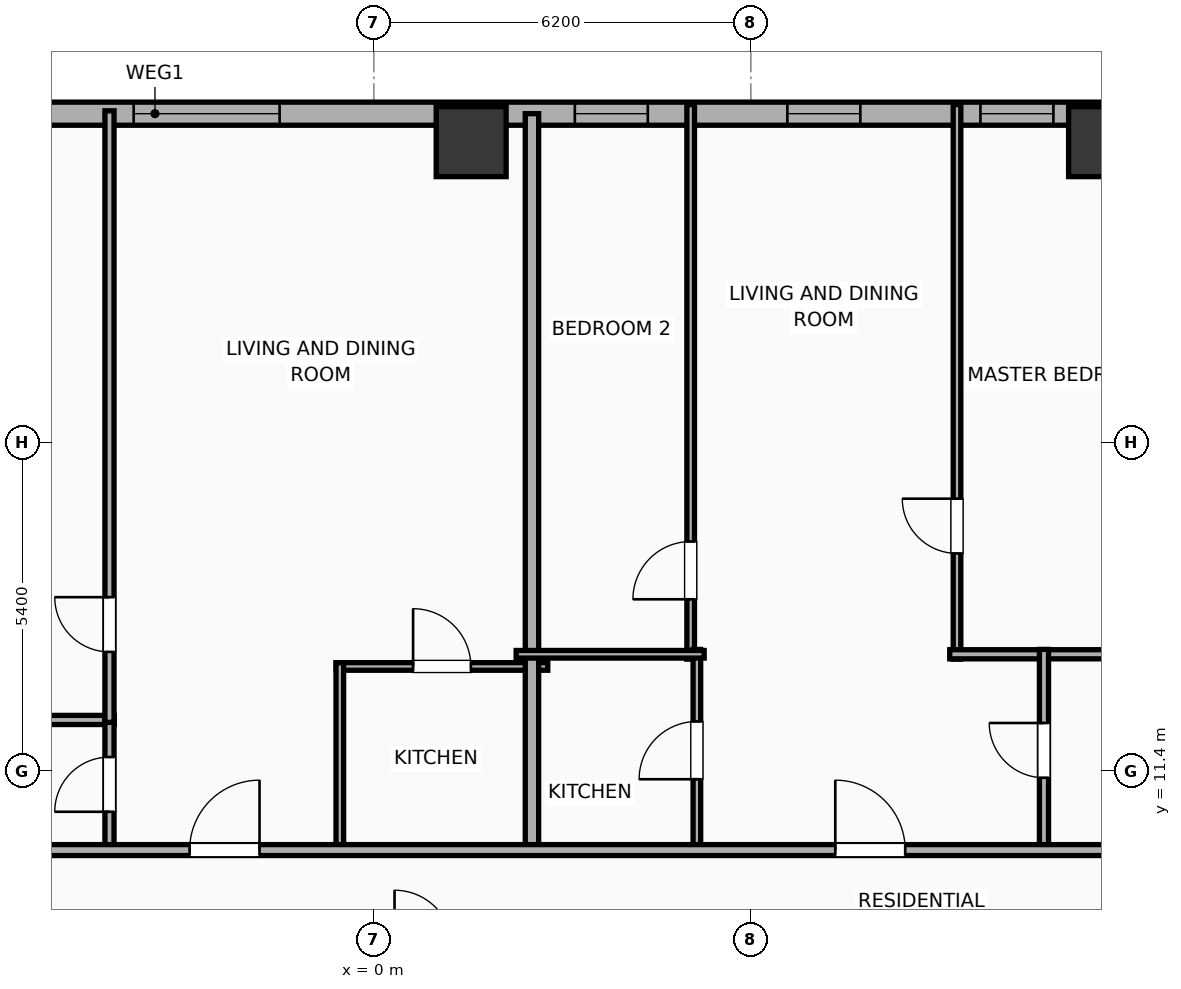
"""IFC4 building model, lengths in metres.
Left out: names, types, materials, properties, quantities, classifications, styles, units other than length and angle.
Written with IfcOpenShell. Run it as: python <this file> out.ifc"""

import sys

from ifc_helpers import new_model, si_unit, direction, frame, frame_2d, origin, origin_2d, place, context, subcontext, project, spatial, rectangle, hollow_rectangle, extrude, element, fill, save


model = new_model("IFC4")
c1 = context("Model", 3, precision=1e-05, world=origin(), true_north=direction((0.0, 1.0)))
c2 = subcontext(c1, "Body", "Model", "MODEL_VIEW")
j1 = project(units=[si_unit("LENGTHUNIT", "METRE"), si_unit("PLANEANGLEUNIT", "RADIAN")], contexts=[c1])
p1 = place(None, origin())
s1 = spatial("IfcSite", under=j1, at=p1, CompositionType="ELEMENT")
p2 = place(p1, origin())
s2 = spatial("IfcBuilding", under=s1, at=p2, CompositionType="ELEMENT")
p3 = place(p2, frame((0.0, 0.0, 45.5)))
s3 = spatial("IfcBuildingStorey", under=s2, at=p3, CompositionType="ELEMENT", Elevation=45.5)
for number, where, z_axis, x_axis in (
    (1, (12.0, 21.75, 0.0), (0.0, 0.0, 1.0), (1.0, 0.0, 0.0)),
    (2, (1.6, 21.75, 0.0), (0.0, 0.0, 1.0), (1.0, 0.0, 0.0)),
):
    element("IfcColumn", number, at=place(p3, frame(where, z_axis=z_axis, x_axis=x_axis)), inside=s3, PredefinedType="COLUMN", context=c2, shape_type="SweptSolid", body=[
        extrude(hollow_rectangle(XDim=1.15, YDim=1.15, WallThickness=0.04, at=origin_2d()), origin(), (0.0, 0.0, 1.0), 3.9),
    ])
p4 = place(p3, frame((-29.581, 22.21, 0.0), z_axis=(0.0, 0.0, 1.0), x_axis=(1.0, 0.0, 0.0)))
e3 = element("IfcWall", 3, at=p4, inside=s3, PredefinedType="ELEMENTEDWALL", context=c2, shape_type="SweptSolid", body=[
    extrude(rectangle(XDim=51.963, YDim=0.38, at=frame_2d((25.981, 0.0))), origin(), (0.0, 0.0, 1.0), 3.65),
])
p5 = place(p4, frame((25.631, 0.0, 0.75)))
e4 = element("IfcOpeningElement", 4, at=p5, cuts=e3, PredefinedType="OPENING", context=c2, shape_type="SweptSolid", body=[
    extrude(rectangle(XDim=2.4, YDim=2.1, at=frame_2d((1.2, 1.05))), frame((0.0, 0.2, 0.0), z_axis=(0.0, -1.0, 0.0), x_axis=(1.0, 0.0, 0.0)), (0.0, 0.0, 1.0), 0.4),
])
p6 = place(p4, frame((42.952, 0.0, 0.75)))
e5 = element("IfcOpeningElement", 5, at=p6, cuts=e3, PredefinedType="OPENING", context=c2, shape_type="SweptSolid", body=[
    extrude(rectangle(XDim=2.4, YDim=2.1, at=frame_2d((1.2, 1.05))), frame((0.0, 0.2, 0.0), z_axis=(0.0, -1.0, 0.0), x_axis=(1.0, 0.0, 0.0)), (0.0, 0.0, 1.0), 0.4),
])
p7 = place(p4, frame((1.731, 0.0, 0.75)))
e6 = element("IfcOpeningElement", 6, at=p7, cuts=e3, PredefinedType="OPENING", context=c2, shape_type="SweptSolid", body=[
    extrude(rectangle(XDim=1.2, YDim=2.05, at=frame_2d((0.6, 1.025))), frame((0.0, 0.2, 0.0), z_axis=(0.0, -1.0, 0.0), x_axis=(1.0, 0.0, 0.0)), (0.0, 0.0, 1.0), 0.4),
])
p8 = place(p4, frame((5.272, 0.0, 0.75)))
e7 = element("IfcOpeningElement", 7, at=p8, cuts=e3, PredefinedType="OPENING", context=c2, shape_type="SweptSolid", body=[
    extrude(rectangle(XDim=1.2, YDim=2.05, at=frame_2d((0.6, 1.025))), frame((0.0, 0.2, 0.0), z_axis=(0.0, -1.0, 0.0), x_axis=(1.0, 0.0, 0.0)), (0.0, 0.0, 1.0), 0.4),
])
p9 = place(p4, frame((8.356, 0.0, 0.75)))
e8 = element("IfcOpeningElement", 8, at=p9, cuts=e3, PredefinedType="OPENING", context=c2, shape_type="SweptSolid", body=[
    extrude(rectangle(XDim=1.2, YDim=2.05, at=frame_2d((0.6, 1.025))), frame((0.0, 0.2, 0.0), z_axis=(0.0, -1.0, 0.0), x_axis=(1.0, 0.0, 0.0)), (0.0, 0.0, 1.0), 0.4),
])
p10 = place(p4, frame((15.632, 0.0, 0.75)))
e9 = element("IfcOpeningElement", 9, at=p10, cuts=e3, PredefinedType="OPENING", context=c2, shape_type="SweptSolid", body=[
    extrude(rectangle(XDim=1.2, YDim=2.05, at=frame_2d((0.6, 1.025))), frame((0.0, 0.2, 0.0), z_axis=(0.0, -1.0, 0.0), x_axis=(1.0, 0.0, 0.0)), (0.0, 0.0, 1.0), 0.4),
])
p11 = place(p4, frame((12.137, 0.0, 0.75)))
e10 = element("IfcOpeningElement", 10, at=p11, cuts=e3, PredefinedType="OPENING", context=c2, shape_type="SweptSolid", body=[
    extrude(rectangle(XDim=1.2, YDim=2.05, at=frame_2d((0.6, 1.025))), frame((0.0, 0.2, 0.0), z_axis=(0.0, -1.0, 0.0), x_axis=(1.0, 0.0, 0.0)), (0.0, 0.0, 1.0), 0.4),
])
p12 = place(p4, frame((18.756, 0.0, 0.75)))
e11 = element("IfcOpeningElement", 11, at=p12, cuts=e3, PredefinedType="OPENING", context=c2, shape_type="SweptSolid", body=[
    extrude(rectangle(XDim=1.2, YDim=2.05, at=frame_2d((0.6, 1.025))), frame((0.0, 0.2, 0.0), z_axis=(0.0, -1.0, 0.0), x_axis=(1.0, 0.0, 0.0)), (0.0, 0.0, 1.0), 0.4),
])
p13 = place(p4, frame((22.907, 0.0, 0.75)))
e12 = element("IfcOpeningElement", 12, at=p13, cuts=e3, PredefinedType="OPENING", context=c2, shape_type="SweptSolid", body=[
    extrude(rectangle(XDim=1.2, YDim=2.05, at=frame_2d((0.6, 1.025))), frame((0.0, 0.2, 0.0), z_axis=(0.0, -1.0, 0.0), x_axis=(1.0, 0.0, 0.0)), (0.0, 0.0, 1.0), 0.4),
])
p14 = place(p4, frame((36.381, 0.0, 0.75)))
e13 = element("IfcOpeningElement", 13, at=p14, cuts=e3, PredefinedType="OPENING", context=c2, shape_type="SweptSolid", body=[
    extrude(rectangle(XDim=1.2, YDim=2.05, at=frame_2d((0.6, 1.025))), frame((0.0, 0.2, 0.0), z_axis=(0.0, -1.0, 0.0), x_axis=(1.0, 0.0, 0.0)), (0.0, 0.0, 1.0), 0.4),
])
p15 = place(p4, frame((32.886, 0.0, 0.75)))
e14 = element("IfcOpeningElement", 14, at=p15, cuts=e3, PredefinedType="OPENING", context=c2, shape_type="SweptSolid", body=[
    extrude(rectangle(XDim=1.2, YDim=2.05, at=frame_2d((0.6, 1.025))), frame((0.0, 0.2, 0.0), z_axis=(0.0, -1.0, 0.0), x_axis=(1.0, 0.0, 0.0)), (0.0, 0.0, 1.0), 0.4),
])
p16 = place(p4, frame((39.556, 0.0, 0.75)))
e15 = element("IfcOpeningElement", 15, at=p16, cuts=e3, PredefinedType="OPENING", context=c2, shape_type="SweptSolid", body=[
    extrude(rectangle(XDim=1.2, YDim=2.05, at=frame_2d((0.6, 1.025))), frame((0.0, 0.2, 0.0), z_axis=(0.0, -1.0, 0.0), x_axis=(1.0, 0.0, 0.0)), (0.0, 0.0, 1.0), 0.4),
])
p17 = place(p4, frame((46.885, 0.0, 0.75)))
e16 = element("IfcOpeningElement", 16, at=p17, cuts=e3, PredefinedType="OPENING", context=c2, shape_type="SweptSolid", body=[
    extrude(rectangle(XDim=1.2, YDim=2.05, at=frame_2d((0.6, 1.025))), frame((0.0, 0.2, 0.0), z_axis=(0.0, -1.0, 0.0), x_axis=(1.0, 0.0, 0.0)), (0.0, 0.0, 1.0), 0.4),
])
p18 = place(p4, frame((49.531, 0.0, 0.75)))
e17 = element("IfcOpeningElement", 17, at=p18, cuts=e3, PredefinedType="OPENING", context=c2, shape_type="SweptSolid", body=[
    extrude(rectangle(XDim=1.2, YDim=2.05, at=frame_2d((0.6, 1.025))), frame((0.0, 0.2, 0.0), z_axis=(0.0, -1.0, 0.0), x_axis=(1.0, 0.0, 0.0)), (0.0, 0.0, 1.0), 0.4),
])
p19 = place(p3, frame((-8.06, 12.24, 0.0), z_axis=(0.0, 0.0, 1.0), x_axis=(1.0, 0.0, 0.0)))
e18 = element("IfcWall", 18, at=p19, inside=s3, PredefinedType="PLUMBINGWALL", context=c2, shape_type="SweptSolid", body=[
    extrude(rectangle(XDim=3.792, YDim=0.15, at=frame_2d((1.896, 0.0))), origin(), (0.0, 0.0, 1.0), 3.65),
])
p20 = place(p3, frame((-4.348, 10.08, 0.0), z_axis=(0.0, 0.0, 1.0), x_axis=(0.0, 1.0, 0.0)))
e19 = element("IfcWall", 19, at=p20, inside=s3, PredefinedType="PLUMBINGWALL", context=c2, shape_type="SweptSolid", body=[
    extrude(rectangle(XDim=2.2, YDim=0.15, at=frame_2d((1.1, 0.0))), origin(), (0.0, 0.0, 1.0), 3.65),
])
p21 = place(p20, frame((0.65, 0.0, 0.0)))
e20 = element("IfcOpeningElement", 20, at=p21, cuts=e19, PredefinedType="OPENING", context=c2, shape_type="SweptSolid", body=[
    extrude(rectangle(XDim=0.9, YDim=2.05, at=frame_2d((0.45, 1.025))), frame((0.0, 0.085, 0.0), z_axis=(0.0, -1.0, 0.0), x_axis=(1.0, 0.0, 0.0)), (0.0, 0.0, 1.0), 0.17),
])
p22 = place(p3, frame((-4.348, 12.2, 0.0), z_axis=(0.0, 0.0, 1.0), x_axis=(0.0, 1.0, 0.0)))
e21 = element("IfcWall", 21, at=p22, inside=s3, PredefinedType="PLUMBINGWALL", context=c2, shape_type="SweptSolid", body=[
    extrude(rectangle(XDim=10.058, YDim=0.15, at=frame_2d((5.029, 0.0))), origin(), (0.0, 0.0, 1.0), 3.65),
])
p23 = place(p22, frame((1.159, 0.0, 0.0)))
e22 = element("IfcOpeningElement", 22, at=p23, cuts=e21, PredefinedType="OPENING", context=c2, shape_type="SweptSolid", body=[
    extrude(rectangle(XDim=0.9, YDim=2.05, at=frame_2d((0.45, 1.025))), frame((0.0, 0.085, 0.0), z_axis=(0.0, -1.0, 0.0), x_axis=(1.0, 0.0, 0.0)), (0.0, 0.0, 1.0), 0.17),
])
p24 = place(p3, frame((-0.62, 13.12, 0.0), z_axis=(0.0, 0.0, 1.0), x_axis=(1.0, 0.0, 0.0)))
e23 = element("IfcWall", 23, at=p24, inside=s3, PredefinedType="PARTITIONING", context=c2, shape_type="SweptSolid", body=[
    extrude(rectangle(XDim=3.48, YDim=0.125, at=frame_2d((1.74, 0.0))), origin(), (0.0, 0.0, 1.0), 3.65),
])
p25 = place(p24, frame((1.265, 0.0, 0.0)))
e24 = element("IfcOpeningElement", 24, at=p25, cuts=e23, PredefinedType="OPENING", context=c2, shape_type="SweptSolid", body=[
    extrude(rectangle(XDim=0.95, YDim=2.05, at=frame_2d((0.475, 1.025))), frame((0.0, 0.073, 0.0), z_axis=(0.0, -1.0, 0.0), x_axis=(1.0, 0.0, 0.0)), (0.0, 0.0, 1.0), 0.145),
])
p26 = place(p3, frame((-0.56, 10.08, 0.0), z_axis=(0.0, 0.0, 1.0), x_axis=(0.0, 1.0, 0.0)))
e25 = element("IfcWall", 25, at=p26, inside=s3, PredefinedType="PARTITIONING", context=c2, shape_type="SweptSolid", body=[
    extrude(rectangle(XDim=3.1, YDim=0.125, at=frame_2d((1.55, 0.0))), origin(), (0.0, 0.0, 1.0), 3.65),
])
p27 = place(p3, frame((2.6, 10.02, 0.0), z_axis=(0.0, 0.0, 1.0), x_axis=(0.0, 1.0, 0.0)))
e26 = element("IfcWall", 26, at=p27, inside=s3, PredefinedType="PARTITIONING", context=c2, shape_type="SweptSolid", body=[
    extrude(rectangle(XDim=12.19, YDim=0.22, at=frame_2d((6.095, 0.0))), origin(), (0.0, 0.0, 1.0), 2.94),
])
p28 = place(p3, frame((5.21, 13.24, 0.0), z_axis=(0.0, 0.0, 1.0), x_axis=(0.0, 1.0, 0.0)))
e27 = element("IfcWall", 27, at=p28, inside=s3, PredefinedType="PARTITIONING", context=c2, shape_type="SweptSolid", body=[
    extrude(rectangle(XDim=9.12, YDim=0.125, at=frame_2d((4.56, 0.0))), origin(), (0.0, 0.0, 1.0), 3.65),
])
p29 = place(p28, frame((0.984, 0.0, 0.0)))
e28 = element("IfcOpeningElement", 28, at=p29, cuts=e27, PredefinedType="OPENING", context=c2, shape_type="SweptSolid", body=[
    extrude(rectangle(XDim=0.95, YDim=2.05, at=frame_2d((0.475, 1.025))), frame((0.0, 0.073, 0.0), z_axis=(0.0, -1.0, 0.0), x_axis=(1.0, 0.0, 0.0)), (0.0, 0.0, 1.0), 0.145),
])
p30 = place(p3, frame((9.59, 13.24, 0.0), z_axis=(0.0, 0.0, 1.0), x_axis=(0.0, 1.0, 0.0)))
e29 = element("IfcWall", 29, at=p30, inside=s3, PredefinedType="PARTITIONING", context=c2, shape_type="SweptSolid", body=[
    extrude(rectangle(XDim=9.12, YDim=0.125, at=frame_2d((4.56, 0.0))), origin(), (0.0, 0.0, 1.0), 3.65),
])
p31 = place(p30, frame((1.739, 0.0, 0.0)))
e30 = element("IfcOpeningElement", 30, at=p31, cuts=e29, PredefinedType="OPENING", context=c2, shape_type="SweptSolid", body=[
    extrude(rectangle(XDim=0.9, YDim=2.05, at=frame_2d((0.45, 1.025))), frame((0.0, 0.073, 0.0), z_axis=(0.0, -1.0, 0.0), x_axis=(1.0, 0.0, 0.0)), (0.0, 0.0, 1.0), 0.145),
])
p32 = place(p3, frame((9.47, 13.32, 0.0), z_axis=(0.0, 0.0, 1.0), x_axis=(1.0, 0.0, 0.0)))
e31 = element("IfcWall", 31, at=p32, inside=s3, PredefinedType="PLUMBINGWALL", context=c2, shape_type="SweptSolid", body=[
    extrude(rectangle(XDim=3.605, YDim=0.15, at=frame_2d((1.802, 0.0))), origin(), (0.0, 0.0, 1.0), 3.65),
])
p33 = place(p3, frame((5.312, 10.08, 0.0), z_axis=(0.0, 0.0, 1.0), x_axis=(0.0, 1.0, 0.0)))
e32 = element("IfcWall", 32, at=p33, inside=s3, PredefinedType="PARTITIONING", context=c2, shape_type="SweptSolid", body=[
    extrude(rectangle(XDim=3.32, YDim=0.125, at=frame_2d((1.66, 0.0))), origin(), (0.0, 0.0, 1.0), 3.65),
])
p34 = place(p33, frame((1.185, 0.0, 0.0)))
e33 = element("IfcOpeningElement", 33, at=p34, cuts=e32, PredefinedType="OPENING", context=c2, shape_type="SweptSolid", body=[
    extrude(rectangle(XDim=0.95, YDim=2.05, at=frame_2d((0.475, 1.025))), frame((0.0, 0.073, 0.0), z_axis=(0.0, -1.0, 0.0), x_axis=(1.0, 0.0, 0.0)), (0.0, 0.0, 1.0), 0.145),
])
p35 = place(p3, frame((2.34, 13.32, 0.0), z_axis=(0.0, 0.0, 1.0), x_axis=(1.0, 0.0, 0.0)))
e34 = element("IfcWall", 34, at=p35, inside=s3, PredefinedType="PARTITIONING", context=c2, shape_type="SweptSolid", body=[
    extrude(rectangle(XDim=3.092, YDim=0.125, at=frame_2d((1.546, 0.0))), origin(), (0.0, 0.0, 1.0), 3.65),
])
p36 = place(p3, frame((11.02, 10.08, 0.0), z_axis=(0.0, 0.0, 1.0), x_axis=(0.0, 1.0, 0.0)))
e35 = element("IfcWall", 35, at=p36, inside=s3, PredefinedType="PLUMBINGWALL", context=c2, shape_type="SweptSolid", body=[
    extrude(rectangle(XDim=3.32, YDim=0.15, at=frame_2d((1.66, 0.0))), origin(), (0.0, 0.0, 1.0), 3.65),
])
p37 = place(p36, frame((1.21, 0.0, 0.0)))
e36 = element("IfcOpeningElement", 36, at=p37, cuts=e35, PredefinedType="OPENING", context=c2, shape_type="SweptSolid", body=[
    extrude(rectangle(XDim=0.9, YDim=2.05, at=frame_2d((0.45, 1.025))), frame((0.0, 0.085, 0.0), z_axis=(0.0, -1.0, 0.0), x_axis=(1.0, 0.0, 0.0)), (0.0, 0.0, 1.0), 0.17),
])
p38 = place(p3, frame((-33.41, 10.1, 0.0), z_axis=(0.0, 0.0, 1.0), x_axis=(1.0, 0.0, 0.0)))
e37 = element("IfcWall", 37, at=p38, inside=s3, PredefinedType="PARTITIONING", context=c2, shape_type="SweptSolid", body=[
    extrude(rectangle(XDim=59.62, YDim=0.18, at=frame_2d((29.81, 0.0))), origin(), (0.0, 0.0, 1.0), 3.65),
])
p39 = place(p38, frame((3.354, 0.0, 0.0)))
e38 = element("IfcOpeningElement", 38, at=p39, cuts=e37, PredefinedType="OPENING", context=c2, shape_type="SweptSolid", body=[
    extrude(rectangle(XDim=1.15, YDim=2.05, at=frame_2d((0.575, 1.025))), frame((0.0, 0.1, 0.0), z_axis=(0.0, -1.0, 0.0), x_axis=(1.0, 0.0, 0.0)), (0.0, 0.0, 1.0), 0.2),
])
p40 = place(p38, frame((10.997, 0.0, 0.0)))
e39 = element("IfcOpeningElement", 39, at=p40, cuts=e37, PredefinedType="OPENING", context=c2, shape_type="SweptSolid", body=[
    extrude(rectangle(XDim=1.15, YDim=2.05, at=frame_2d((0.575, 1.025))), frame((0.0, 0.1, 0.0), z_axis=(0.0, -1.0, 0.0), x_axis=(1.0, 0.0, 0.0)), (0.0, 0.0, 1.0), 0.2),
])
p41 = place(p38, frame((20.232, 0.0, 0.0)))
e40 = element("IfcOpeningElement", 40, at=p41, cuts=e37, PredefinedType="OPENING", context=c2, shape_type="SweptSolid", body=[
    extrude(rectangle(XDim=1.15, YDim=2.05, at=frame_2d((0.575, 1.025))), frame((0.0, 0.1, 0.0), z_axis=(0.0, -1.0, 0.0), x_axis=(1.0, 0.0, 0.0)), (0.0, 0.0, 1.0), 0.2),
])
p42 = place(p38, frame((30.38, 0.0, 0.0)))
e41 = element("IfcOpeningElement", 41, at=p42, cuts=e37, PredefinedType="OPENING", context=c2, shape_type="SweptSolid", body=[
    extrude(rectangle(XDim=1.15, YDim=2.05, at=frame_2d((0.575, 1.025))), frame((0.0, 0.1, 0.0), z_axis=(0.0, -1.0, 0.0), x_axis=(1.0, 0.0, 0.0)), (0.0, 0.0, 1.0), 0.2),
])
p43 = place(p38, frame((40.998, 0.0, 0.0)))
e42 = element("IfcOpeningElement", 42, at=p43, cuts=e37, PredefinedType="OPENING", context=c2, shape_type="SweptSolid", body=[
    extrude(rectangle(XDim=1.15, YDim=2.05, at=frame_2d((0.575, 1.025))), frame((0.0, 0.1, 0.0), z_axis=(0.0, -1.0, 0.0), x_axis=(1.0, 0.0, 0.0)), (0.0, 0.0, 1.0), 0.2),
])
p44 = place(p38, frame((49.428, 0.0, 0.0)))
e43 = element("IfcOpeningElement", 43, at=p44, cuts=e37, PredefinedType="OPENING", context=c2, shape_type="SweptSolid", body=[
    extrude(rectangle(XDim=0.9, YDim=2.05, at=frame_2d((0.45, 1.025))), frame((0.0, 0.1, 0.0), z_axis=(0.0, -1.0, 0.0), x_axis=(1.0, 0.0, 0.0)), (0.0, 0.0, 1.0), 0.2),
])
p45 = place(p38, frame((56.07, 0.0, 0.0)))
e44 = element("IfcOpeningElement", 44, at=p45, cuts=e37, PredefinedType="OPENING", context=c2, shape_type="SweptSolid", body=[
    extrude(rectangle(XDim=0.9, YDim=2.05, at=frame_2d((0.45, 1.025))), frame((0.0, 0.1, 0.0), z_axis=(0.0, -1.0, 0.0), x_axis=(1.0, 0.0, 0.0)), (0.0, 0.0, 1.0), 0.2),
])
p46 = place(p5, origin())
e45 = element("IfcWindow", 45, at=p46, inside=s3, PartitioningType="SINGLE_PANEL", PredefinedType="WINDOW", context=c2, shape_type="SweptSolid", body=[
    extrude(rectangle(XDim=2.4, YDim=2.1, at=frame_2d((1.2, 1.05))), frame((0.0, 0.03, 0.0), z_axis=(0.0, -1.0, 0.0), x_axis=(1.0, 0.0, 0.0)), (0.0, 0.0, 1.0), 0.06),
])
fill(e4, e45)
p47 = place(p14, origin())
e46 = element("IfcWindow", 46, at=p47, inside=s3, PartitioningType="SINGLE_PANEL", PredefinedType="WINDOW", context=c2, shape_type="SweptSolid", body=[
    extrude(rectangle(XDim=1.2, YDim=2.05, at=frame_2d((0.6, 1.025))), frame((0.0, 0.03, 0.0), z_axis=(0.0, -1.0, 0.0), x_axis=(1.0, 0.0, 0.0)), (0.0, 0.0, 1.0), 0.06),
])
fill(e13, e46)
p48 = place(p15, origin())
e47 = element("IfcWindow", 47, at=p48, inside=s3, PartitioningType="SINGLE_PANEL", PredefinedType="WINDOW", context=c2, shape_type="SweptSolid", body=[
    extrude(rectangle(XDim=1.2, YDim=2.05, at=frame_2d((0.6, 1.025))), frame((0.0, 0.03, 0.0), z_axis=(0.0, -1.0, 0.0), x_axis=(1.0, 0.0, 0.0)), (0.0, 0.0, 1.0), 0.06),
])
fill(e14, e47)
p49 = place(p16, origin())
e48 = element("IfcWindow", 48, at=p49, inside=s3, PartitioningType="SINGLE_PANEL", PredefinedType="WINDOW", context=c2, shape_type="SweptSolid", body=[
    extrude(rectangle(XDim=1.2, YDim=2.05, at=frame_2d((0.6, 1.025))), frame((0.0, 0.03, 0.0), z_axis=(0.0, -1.0, 0.0), x_axis=(1.0, 0.0, 0.0)), (0.0, 0.0, 1.0), 0.06),
])
fill(e15, e48)
p50 = place(p21, origin())
e49 = element("IfcDoor", 49, at=p50, inside=s3, OperationType="SINGLE_SWING_LEFT", PredefinedType="DOOR", context=c2, shape_type="SweptSolid", body=[
    extrude(rectangle(XDim=0.9, YDim=2.05, at=frame_2d((0.45, 1.025))), frame((0.0, 0.025, 0.0), z_axis=(0.0, -1.0, 0.0), x_axis=(1.0, 0.0, 0.0)), (0.0, 0.0, 1.0), 0.05),
])
fill(e20, e49)
p51 = place(p23, origin())
e50 = element("IfcDoor", 50, at=p51, inside=s3, OperationType="SINGLE_SWING_RIGHT", PredefinedType="DOOR", context=c2, shape_type="SweptSolid", body=[
    extrude(rectangle(XDim=0.9, YDim=2.05, at=frame_2d((0.45, 1.025))), frame((0.0, 0.025, 0.0), z_axis=(0.0, -1.0, 0.0), x_axis=(1.0, 0.0, 0.0)), (0.0, 0.0, 1.0), 0.05),
])
fill(e22, e50)
p52 = place(p25, origin())
e51 = element("IfcDoor", 51, at=p52, inside=s3, OperationType="SINGLE_SWING_LEFT", PredefinedType="DOOR", context=c2, shape_type="SweptSolid", body=[
    extrude(rectangle(XDim=0.95, YDim=2.05, at=frame_2d((0.475, 1.025))), frame((0.0, 0.025, 0.0), z_axis=(0.0, -1.0, 0.0), x_axis=(1.0, 0.0, 0.0)), (0.0, 0.0, 1.0), 0.05),
])
fill(e24, e51)
p53 = place(p29, origin())
e52 = element("IfcDoor", 52, at=p53, inside=s3, OperationType="SINGLE_SWING_LEFT", PredefinedType="DOOR", context=c2, shape_type="SweptSolid", body=[
    extrude(rectangle(XDim=0.95, YDim=2.05, at=frame_2d((0.475, 1.025))), frame((0.0, 0.025, 0.0), z_axis=(0.0, -1.0, 0.0), x_axis=(1.0, 0.0, 0.0)), (0.0, 0.0, 1.0), 0.05),
])
fill(e28, e52)
p54 = place(p31, origin())
e53 = element("IfcDoor", 53, at=p54, inside=s3, OperationType="SINGLE_SWING_RIGHT", PredefinedType="DOOR", context=c2, shape_type="SweptSolid", body=[
    extrude(rectangle(XDim=0.9, YDim=2.05, at=frame_2d((0.45, 1.025))), frame((0.0, 0.025, 0.0), z_axis=(0.0, -1.0, 0.0), x_axis=(1.0, 0.0, 0.0)), (0.0, 0.0, 1.0), 0.05),
])
fill(e30, e53)
p55 = place(p34, origin())
e54 = element("IfcDoor", 54, at=p55, inside=s3, OperationType="SINGLE_SWING_LEFT", PredefinedType="DOOR", context=c2, shape_type="SweptSolid", body=[
    extrude(rectangle(XDim=0.95, YDim=2.05, at=frame_2d((0.475, 1.025))), frame((0.0, 0.025, 0.0), z_axis=(0.0, -1.0, 0.0), x_axis=(1.0, 0.0, 0.0)), (0.0, 0.0, 1.0), 0.05),
])
fill(e33, e54)
p56 = place(p37, origin())
e55 = element("IfcDoor", 55, at=p56, inside=s3, OperationType="SINGLE_SWING_RIGHT", PredefinedType="DOOR", context=c2, shape_type="SweptSolid", body=[
    extrude(rectangle(XDim=0.9, YDim=2.05, at=frame_2d((0.45, 1.025))), frame((0.0, 0.025, 0.0), z_axis=(0.0, -1.0, 0.0), x_axis=(1.0, 0.0, 0.0)), (0.0, 0.0, 1.0), 0.05),
])
fill(e36, e55)
p57 = place(p42, origin())
e56 = element("IfcDoor", 56, at=p57, inside=s3, OperationType="SINGLE_SWING_RIGHT", PredefinedType="DOOR", context=c2, shape_type="SweptSolid", body=[
    extrude(rectangle(XDim=1.15, YDim=2.05, at=frame_2d((0.575, 1.025))), frame((0.0, 0.025, 0.0), z_axis=(0.0, -1.0, 0.0), x_axis=(1.0, 0.0, 0.0)), (0.0, 0.0, 1.0), 0.05),
])
fill(e41, e56)
p58 = place(p43, origin())
e57 = element("IfcDoor", 57, at=p58, inside=s3, OperationType="SINGLE_SWING_LEFT", PredefinedType="DOOR", context=c2, shape_type="SweptSolid", body=[
    extrude(rectangle(XDim=1.15, YDim=2.05, at=frame_2d((0.575, 1.025))), frame((0.0, 0.025, 0.0), z_axis=(0.0, -1.0, 0.0), x_axis=(1.0, 0.0, 0.0)), (0.0, 0.0, 1.0), 0.05),
])
fill(e42, e57)
save(model, sys.argv[1])
